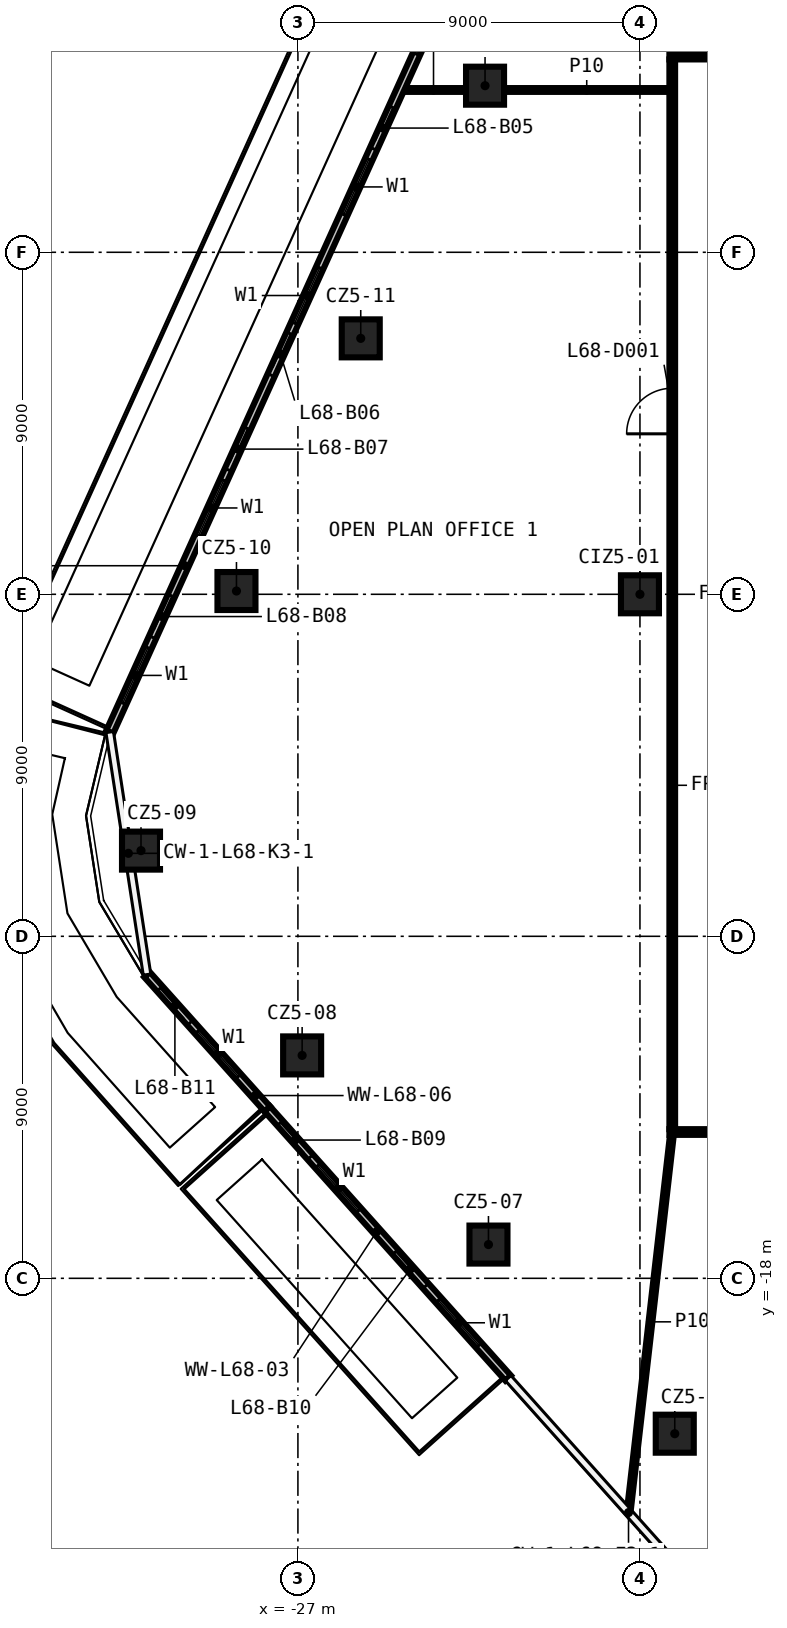
"""IFC4 building model, lengths in metres.
Left out: names, types, materials, properties, quantities, classifications, styles, units other than length and angle.
Written with IfcOpenShell. Run it as: python <this file> out.ifc"""

import sys

from ifc_helpers import new_model, si_unit, direction, frame, frame_2d, origin, origin_2d, place, context, subcontext, project, spatial, rectangle, extrude, element, fill, save


model = new_model("IFC4")
c1 = context("Model", 3, precision=1e-05, world=origin(), true_north=direction((0.0, 1.0)))
c2 = subcontext(c1, "Body", "Model", "MODEL_VIEW")
j1 = project(units=[si_unit("LENGTHUNIT", "METRE"), si_unit("PLANEANGLEUNIT", "RADIAN")], contexts=[c1])
p1 = place(None, origin())
s1 = spatial("IfcSite", under=j1, at=p1, CompositionType="ELEMENT")
p2 = place(p1, origin())
s2 = spatial("IfcBuilding", under=s1, at=p2, CompositionType="ELEMENT")
p3 = place(p2, frame((0.0, 0.0, 319.4)))
s3 = spatial("IfcBuildingStorey", under=s2, at=p3, CompositionType="ELEMENT", Elevation=319.4)
for number, where, z_axis, x_axis in (
    (1, (-17.084, -22.089, 0.0), (0.0, 0.0, 1.0), (1.0, 0.0, 0.0)),
    (2, (-21.986, -17.112, 0.0), (0.0, 0.0, 1.0), (1.0, 0.0, 0.0)),
    (3, (-26.889, -12.134, 0.0), (0.0, 0.0, 1.0), (1.0, 0.0, 0.0)),
    (4, (-31.129, -6.745, 0.0), (0.0, 0.0, 1.0), (1.0, 0.0, 0.0)),
    (5, (-28.617, 0.086, 0.0), (0.0, 0.0, 1.0), (1.0, 0.0, 0.0)),
    (6, (-25.347, 6.735, 0.0), (0.0, 0.0, 1.0), (1.0, 0.0, 0.0)),
    (7, (-22.076, 13.384, 0.0), (0.0, 0.0, 1.0), (1.0, 0.0, 0.0)),
    (8, (-18.0, 0.0, 0.0), (0.0, 0.0, 1.0), (1.0, 0.0, 0.0)),
):
    element("IfcColumn", number, at=place(p3, frame(where, z_axis=z_axis, x_axis=x_axis)), inside=s3, PredefinedType="COLUMN", context=c2, shape_type="SweptSolid", body=[
        extrude(rectangle(XDim=1.0, YDim=1.0, at=origin_2d()), origin(), (0.0, 0.0, 1.0), 3.82),
    ])
p4 = place(p3, frame((17.225, -14.15, 0.0), z_axis=(0.0, 0.0, 1.0), x_axis=(-1.0, 0.0, 0.0)))
e9 = element("IfcWall", 9, at=p4, inside=s3, PredefinedType="PARTITIONING", context=c2, shape_type="SweptSolid", body=[
    extrude(rectangle(XDim=34.45, YDim=0.15, at=frame_2d((17.225, 0.0))), origin(), (0.0, 0.0, 1.0), 3.82),
])
p5 = place(p4, frame((17.711, 0.0, 0.0)))
e10 = element("IfcOpeningElement", 10, at=p5, cuts=e9, PredefinedType="OPENING", context=c2, shape_type="SweptSolid", body=[
    extrude(rectangle(XDim=1.2, YDim=2.1, at=frame_2d((0.6, 1.05))), frame((0.0, 0.085, 0.0), z_axis=(0.0, -1.0, 0.0), x_axis=(1.0, 0.0, 0.0)), (0.0, 0.0, 1.0), 0.17),
])
p6 = place(p4, frame((4.094, 0.0, 0.0)))
e11 = element("IfcOpeningElement", 11, at=p6, cuts=e9, PredefinedType="OPENING", context=c2, shape_type="SweptSolid", body=[
    extrude(rectangle(XDim=1.2, YDim=2.1, at=frame_2d((0.6, 1.05))), frame((0.0, 0.085, 0.0), z_axis=(0.0, -1.0, 0.0), x_axis=(1.0, 0.0, 0.0)), (0.0, 0.0, 1.0), 0.17),
])
p7 = place(p3, frame((-24.288, 13.271, 0.0), z_axis=(0.0, 0.0, 1.0), x_axis=(1.0, 0.0, 0.0)))
e12 = element("IfcWall", 12, at=p7, inside=s3, PredefinedType="PARTITIONING", context=c2, shape_type="SweptSolid", body=[
    extrude(rectangle(XDim=1.712, YDim=0.1, at=frame_2d((0.856, 0.0))), origin(), (0.0, 0.0, 1.0), 3.82),
])
p8 = place(p3, frame((-21.576, 13.271, 0.0), z_axis=(0.0, 0.0, 1.0), x_axis=(1.0, 0.0, 0.0)))
e13 = element("IfcWall", 13, at=p8, inside=s3, PredefinedType="PARTITIONING", context=c2, shape_type="SweptSolid", body=[
    extrude(rectangle(XDim=4.351, YDim=0.1, at=frame_2d((2.175, 0.0))), origin(), (0.0, 0.0, 1.0), 3.82),
])
p9 = place(p3, frame((-17.225, 14.15, 0.0), z_axis=(0.0, 0.0, 1.0), x_axis=(1.0, 0.0, 0.0)))
e14 = element("IfcWall", 14, at=p9, inside=s3, PredefinedType="PARTITIONING", context=c2, shape_type="SweptSolid", body=[
    extrude(rectangle(XDim=34.45, YDim=0.15, at=frame_2d((17.225, 0.0))), origin(), (0.0, 0.0, 1.0), 3.82),
])
p10 = place(p9, frame((17.706, 0.0, 0.0)))
e15 = element("IfcOpeningElement", 15, at=p10, cuts=e14, PredefinedType="OPENING", context=c2, shape_type="SweptSolid", body=[
    extrude(rectangle(XDim=1.2, YDim=2.1, at=frame_2d((0.6, 1.05))), frame((0.0, 0.085, 0.0), z_axis=(0.0, -1.0, 0.0), x_axis=(1.0, 0.0, 0.0)), (0.0, 0.0, 1.0), 0.17),
])
p11 = place(p3, frame((-18.296, -24.14, 0.0), z_axis=(0.0, 0.0, 1.0), x_axis=(0.11391359401, 0.993490660801, 0.0)))
e16 = element("IfcWall", 16, at=p11, inside=s3, PredefinedType="PARTITIONING", context=c2, shape_type="SweptSolid", body=[
    extrude(rectangle(XDim=10.056, YDim=0.1, at=frame_2d((5.028, 0.0))), origin(), (0.0, 0.0, 1.0), 3.82),
])
p12 = place(p3, frame((-17.15, -14.075, 0.0), z_axis=(0.0, 0.0, 1.0), x_axis=(0.0, 1.0, 0.0)))
e17 = element("IfcWall", 17, at=p12, inside=s3, PredefinedType="PARTITIONING", context=c2, shape_type="SweptSolid", body=[
    extrude(rectangle(XDim=28.15, YDim=0.15, at=frame_2d((14.075, 0.0))), origin(), (0.0, 0.0, 1.0), 3.82),
])
p13 = place(p12, frame((18.298, 0.0, 0.0)))
e18 = element("IfcOpeningElement", 18, at=p13, cuts=e17, PredefinedType="OPENING", context=c2, shape_type="SweptSolid", body=[
    extrude(rectangle(XDim=1.2, YDim=2.1, at=frame_2d((0.6, 1.05))), frame((0.0, 0.085, 0.0), z_axis=(0.0, -1.0, 0.0), x_axis=(1.0, 0.0, 0.0)), (0.0, 0.0, 1.0), 0.17),
])
p14 = place(p3, frame((-22.399, 17.495, 0.0), z_axis=(0.0, 0.0, 1.0), x_axis=(-0.412123946496, -0.911127791654, 0.0)))
e19 = element("IfcWall", 19, at=p14, inside=s3, PredefinedType="SOLIDWALL", context=c2, shape_type="SweptSolid", body=[
    extrude(rectangle(XDim=23.18, YDim=0.2, at=frame_2d((11.59, 0.0))), origin(), (0.0, 0.0, 1.0), 3.82),
])
p15 = place(p14, frame((2.0, 0.0, 0.6)))
e20 = element("IfcOpeningElement", 20, at=p15, cuts=e19, PredefinedType="OPENING", context=c2, shape_type="SweptSolid", body=[
    extrude(rectangle(XDim=1.6, YDim=2.4, at=frame_2d((0.8, 1.2))), frame((0.0, 0.11, 0.0), z_axis=(0.0, -1.0, 0.0), x_axis=(1.0, 0.0, 0.0)), (0.0, 0.0, 1.0), 0.22),
])
p16 = place(p14, frame((0.5, 0.0, 0.0)))
e21 = element("IfcOpeningElement", 21, at=p16, cuts=e19, PredefinedType="OPENING", context=c2, shape_type="SweptSolid", body=[
    extrude(rectangle(XDim=1.2, YDim=2.4, at=frame_2d((0.6, 1.2))), frame((0.0, 0.11, 0.0), z_axis=(0.0, -1.0, 0.0), x_axis=(1.0, 0.0, 0.0)), (0.0, 0.0, 1.0), 0.22),
])
p17 = place(p14, frame((6.636, 0.0, 0.6)))
e22 = element("IfcOpeningElement", 22, at=p17, cuts=e19, PredefinedType="OPENING", context=c2, shape_type="SweptSolid", body=[
    extrude(rectangle(XDim=1.6, YDim=2.4, at=frame_2d((0.8, 1.2))), frame((0.0, 0.11, 0.0), z_axis=(0.0, -1.0, 0.0), x_axis=(1.0, 0.0, 0.0)), (0.0, 0.0, 1.0), 0.22),
])
p18 = place(p14, frame((5.136, 0.0, 0.0)))
e23 = element("IfcOpeningElement", 23, at=p18, cuts=e19, PredefinedType="OPENING", context=c2, shape_type="SweptSolid", body=[
    extrude(rectangle(XDim=1.2, YDim=2.4, at=frame_2d((0.6, 1.2))), frame((0.0, 0.11, 0.0), z_axis=(0.0, -1.0, 0.0), x_axis=(1.0, 0.0, 0.0)), (0.0, 0.0, 1.0), 0.22),
])
p19 = place(p14, frame((9.772, 0.0, 0.6)))
e24 = element("IfcOpeningElement", 24, at=p19, cuts=e19, PredefinedType="OPENING", context=c2, shape_type="SweptSolid", body=[
    extrude(rectangle(XDim=1.6, YDim=2.4, at=frame_2d((0.8, 1.2))), frame((0.0, 0.11, 0.0), z_axis=(0.0, -1.0, 0.0), x_axis=(1.0, 0.0, 0.0)), (0.0, 0.0, 1.0), 0.22),
])
p20 = place(p14, frame((11.672, 0.0, 0.0)))
e25 = element("IfcOpeningElement", 25, at=p20, cuts=e19, PredefinedType="OPENING", context=c2, shape_type="SweptSolid", body=[
    extrude(rectangle(XDim=1.2, YDim=2.4, at=frame_2d((0.6, 1.2))), frame((0.0, 0.11, 0.0), z_axis=(0.0, -1.0, 0.0), x_axis=(1.0, 0.0, 0.0)), (0.0, 0.0, 1.0), 0.22),
])
p21 = place(p14, frame((15.908, 0.0, 0.6)))
e26 = element("IfcOpeningElement", 26, at=p21, cuts=e19, PredefinedType="OPENING", context=c2, shape_type="SweptSolid", body=[
    extrude(rectangle(XDim=1.6, YDim=2.4, at=frame_2d((0.8, 1.2))), frame((0.0, 0.11, 0.0), z_axis=(0.0, -1.0, 0.0), x_axis=(1.0, 0.0, 0.0)), (0.0, 0.0, 1.0), 0.22),
])
p22 = place(p14, frame((14.408, 0.0, 0.0)))
e27 = element("IfcOpeningElement", 27, at=p22, cuts=e19, PredefinedType="OPENING", context=c2, shape_type="SweptSolid", body=[
    extrude(rectangle(XDim=1.2, YDim=2.4, at=frame_2d((0.6, 1.2))), frame((0.0, 0.11, 0.0), z_axis=(0.0, -1.0, 0.0), x_axis=(1.0, 0.0, 0.0)), (0.0, 0.0, 1.0), 0.22),
])
p23 = place(p14, frame((20.744, 0.0, 0.6)))
e28 = element("IfcOpeningElement", 28, at=p23, cuts=e19, PredefinedType="OPENING", context=c2, shape_type="SweptSolid", body=[
    extrude(rectangle(XDim=1.6, YDim=2.4, at=frame_2d((0.8, 1.2))), frame((0.0, 0.11, 0.0), z_axis=(0.0, -1.0, 0.0), x_axis=(1.0, 0.0, 0.0)), (0.0, 0.0, 1.0), 0.22),
])
p24 = place(p14, frame((19.244, 0.0, 0.0)))
e29 = element("IfcOpeningElement", 29, at=p24, cuts=e19, PredefinedType="OPENING", context=c2, shape_type="SweptSolid", body=[
    extrude(rectangle(XDim=1.2, YDim=2.4, at=frame_2d((0.6, 1.2))), frame((0.0, 0.11, 0.0), z_axis=(0.0, -1.0, 0.0), x_axis=(1.0, 0.0, 0.0)), (0.0, 0.0, 1.0), 0.22),
])
p25 = place(p3, frame((-27.807, -13.542, 0.0), z_axis=(0.0, 0.0, 1.0), x_axis=(0.666894702572, -0.745151968179, 0.0)))
e30 = element("IfcWall", 30, at=p25, inside=s3, PredefinedType="SOLIDWALL", context=c2, shape_type="SweptSolid", body=[
    extrude(rectangle(XDim=9.506, YDim=0.2, at=frame_2d((4.753, 0.0))), origin(), (0.0, 0.0, 1.0), 3.82),
])
p26 = place(p25, frame((2.0, 0.0, 0.6)))
e31 = element("IfcOpeningElement", 31, at=p26, cuts=e30, PredefinedType="OPENING", context=c2, shape_type="SweptSolid", body=[
    extrude(rectangle(XDim=1.6, YDim=2.4, at=frame_2d((0.8, 1.2))), frame((0.0, 0.11, 0.0), z_axis=(0.0, -1.0, 0.0), x_axis=(1.0, 0.0, 0.0)), (0.0, 0.0, 1.0), 0.22),
])
p27 = place(p25, frame((0.5, 0.0, 0.0)))
e32 = element("IfcOpeningElement", 32, at=p27, cuts=e30, PredefinedType="OPENING", context=c2, shape_type="SweptSolid", body=[
    extrude(rectangle(XDim=1.2, YDim=2.4, at=frame_2d((0.6, 1.2))), frame((0.0, 0.11, 0.0), z_axis=(0.0, -1.0, 0.0), x_axis=(1.0, 0.0, 0.0)), (0.0, 0.0, 1.0), 0.22),
])
p28 = place(p25, frame((6.753, 0.0, 0.6)))
e33 = element("IfcOpeningElement", 33, at=p28, cuts=e30, PredefinedType="OPENING", context=c2, shape_type="SweptSolid", body=[
    extrude(rectangle(XDim=1.6, YDim=2.4, at=frame_2d((0.8, 1.2))), frame((0.0, 0.11, 0.0), z_axis=(0.0, -1.0, 0.0), x_axis=(1.0, 0.0, 0.0)), (0.0, 0.0, 1.0), 0.22),
])
p29 = place(p25, frame((5.053, 0.0, 0.0)))
e34 = element("IfcOpeningElement", 34, at=p29, cuts=e30, PredefinedType="OPENING", context=c2, shape_type="SweptSolid", body=[
    extrude(rectangle(XDim=1.2, YDim=2.4, at=frame_2d((0.6, 1.2))), frame((0.0, 0.11, 0.0), z_axis=(0.0, -1.0, 0.0), x_axis=(1.0, 0.0, 0.0)), (0.0, 0.0, 1.0), 0.22),
])
p30 = place(p3, frame((-30.97, -10.007, 0.0), z_axis=(0.0, 0.0, 1.0), x_axis=(0.666852029375, -0.745190157556, 0.0)))
e35 = element("IfcWall", 35, at=p30, inside=s3, PredefinedType="SOLIDWALL", context=c2, shape_type="SweptSolid", body=[
    extrude(rectangle(XDim=4.743, YDim=0.2, at=frame_2d((2.372, 0.0))), origin(), (0.0, 0.0, 1.0), 3.82),
])
p31 = place(p30, frame((2.0, 0.0, 0.6)))
e36 = element("IfcOpeningElement", 36, at=p31, cuts=e35, PredefinedType="OPENING", context=c2, shape_type="SweptSolid", body=[
    extrude(rectangle(XDim=1.6, YDim=2.4, at=frame_2d((0.8, 1.2))), frame((0.0, 0.11, 0.0), z_axis=(0.0, -1.0, 0.0), x_axis=(1.0, 0.0, 0.0)), (0.0, 0.0, 1.0), 0.22),
])
p32 = place(p30, frame((0.5, 0.0, 0.0)))
e37 = element("IfcOpeningElement", 37, at=p32, cuts=e35, PredefinedType="OPENING", context=c2, shape_type="SweptSolid", body=[
    extrude(rectangle(XDim=1.2, YDim=2.4, at=frame_2d((0.6, 1.2))), frame((0.0, 0.11, 0.0), z_axis=(0.0, -1.0, 0.0), x_axis=(1.0, 0.0, 0.0)), (0.0, 0.0, 1.0), 0.22),
])
p33 = place(p13, origin())
e38 = element("IfcDoor", 38, at=p33, inside=s3, OperationType="SINGLE_SWING_RIGHT", PredefinedType="DOOR", context=c2, shape_type="SweptSolid", body=[
    extrude(rectangle(XDim=1.2, YDim=2.1, at=frame_2d((0.6, 1.05))), frame((0.0, 0.025, 0.0), z_axis=(0.0, -1.0, 0.0), x_axis=(1.0, 0.0, 0.0)), (0.0, 0.0, 1.0), 0.05),
])
fill(e18, e38)
p34 = place(p15, origin())
e39 = element("IfcWindow", 39, at=p34, inside=s3, PartitioningType="SINGLE_PANEL", PredefinedType="WINDOW", context=c2, shape_type="SweptSolid", body=[
    extrude(rectangle(XDim=1.6, YDim=2.4, at=frame_2d((0.8, 1.2))), frame((0.0, 0.03, 0.0), z_axis=(0.0, -1.0, 0.0), x_axis=(1.0, 0.0, 0.0)), (0.0, 0.0, 1.0), 0.06),
])
fill(e20, e39)
p35 = place(p17, origin())
e40 = element("IfcWindow", 40, at=p35, inside=s3, PartitioningType="SINGLE_PANEL", PredefinedType="WINDOW", context=c2, shape_type="SweptSolid", body=[
    extrude(rectangle(XDim=1.6, YDim=2.4, at=frame_2d((0.8, 1.2))), frame((0.0, 0.03, 0.0), z_axis=(0.0, -1.0, 0.0), x_axis=(1.0, 0.0, 0.0)), (0.0, 0.0, 1.0), 0.06),
])
fill(e22, e40)
p36 = place(p18, origin())
e41 = element("IfcDoor", 41, at=p36, inside=s3, OperationType="SLIDING_TO_LEFT", PredefinedType="DOOR", context=c2, shape_type="SweptSolid", body=[
    extrude(rectangle(XDim=1.2, YDim=2.4, at=frame_2d((0.6, 1.2))), frame((0.0, 0.025, 0.0), z_axis=(0.0, -1.0, 0.0), x_axis=(1.0, 0.0, 0.0)), (0.0, 0.0, 1.0), 0.05),
])
fill(e23, e41)
p37 = place(p19, origin())
e42 = element("IfcWindow", 42, at=p37, inside=s3, PartitioningType="SINGLE_PANEL", PredefinedType="WINDOW", context=c2, shape_type="SweptSolid", body=[
    extrude(rectangle(XDim=1.6, YDim=2.4, at=frame_2d((0.8, 1.2))), frame((0.0, 0.03, 0.0), z_axis=(0.0, -1.0, 0.0), x_axis=(1.0, 0.0, 0.0)), (0.0, 0.0, 1.0), 0.06),
])
fill(e24, e42)
p38 = place(p20, origin())
e43 = element("IfcDoor", 43, at=p38, inside=s3, OperationType="SLIDING_TO_LEFT", PredefinedType="DOOR", context=c2, shape_type="SweptSolid", body=[
    extrude(rectangle(XDim=1.2, YDim=2.4, at=frame_2d((0.6, 1.2))), frame((0.0, 0.025, 0.0), z_axis=(0.0, -1.0, 0.0), x_axis=(1.0, 0.0, 0.0)), (0.0, 0.0, 1.0), 0.05),
])
fill(e25, e43)
p39 = place(p21, origin())
e44 = element("IfcWindow", 44, at=p39, inside=s3, PartitioningType="SINGLE_PANEL", PredefinedType="WINDOW", context=c2, shape_type="SweptSolid", body=[
    extrude(rectangle(XDim=1.6, YDim=2.4, at=frame_2d((0.8, 1.2))), frame((0.0, 0.03, 0.0), z_axis=(0.0, -1.0, 0.0), x_axis=(1.0, 0.0, 0.0)), (0.0, 0.0, 1.0), 0.06),
])
fill(e26, e44)
p40 = place(p22, origin())
e45 = element("IfcDoor", 45, at=p40, inside=s3, OperationType="SLIDING_TO_LEFT", PredefinedType="DOOR", context=c2, shape_type="SweptSolid", body=[
    extrude(rectangle(XDim=1.2, YDim=2.4, at=frame_2d((0.6, 1.2))), frame((0.0, 0.025, 0.0), z_axis=(0.0, -1.0, 0.0), x_axis=(1.0, 0.0, 0.0)), (0.0, 0.0, 1.0), 0.05),
])
fill(e27, e45)
p41 = place(p23, origin())
e46 = element("IfcWindow", 46, at=p41, inside=s3, PartitioningType="SINGLE_PANEL", PredefinedType="WINDOW", context=c2, shape_type="SweptSolid", body=[
    extrude(rectangle(XDim=1.6, YDim=2.4, at=frame_2d((0.8, 1.2))), frame((0.0, 0.03, 0.0), z_axis=(0.0, -1.0, 0.0), x_axis=(1.0, 0.0, 0.0)), (0.0, 0.0, 1.0), 0.06),
])
fill(e28, e46)
p42 = place(p24, origin())
e47 = element("IfcDoor", 47, at=p42, inside=s3, OperationType="SLIDING_TO_LEFT", PredefinedType="DOOR", context=c2, shape_type="SweptSolid", body=[
    extrude(rectangle(XDim=1.2, YDim=2.4, at=frame_2d((0.6, 1.2))), frame((0.0, 0.025, 0.0), z_axis=(0.0, -1.0, 0.0), x_axis=(1.0, 0.0, 0.0)), (0.0, 0.0, 1.0), 0.05),
])
fill(e29, e47)
p43 = place(p26, origin())
e48 = element("IfcWindow", 48, at=p43, inside=s3, PartitioningType="SINGLE_PANEL", PredefinedType="WINDOW", context=c2, shape_type="SweptSolid", body=[
    extrude(rectangle(XDim=1.6, YDim=2.4, at=frame_2d((0.8, 1.2))), frame((0.0, 0.03, 0.0), z_axis=(0.0, -1.0, 0.0), x_axis=(1.0, 0.0, 0.0)), (0.0, 0.0, 1.0), 0.06),
])
fill(e31, e48)
p44 = place(p27, origin())
e49 = element("IfcDoor", 49, at=p44, inside=s3, OperationType="SLIDING_TO_LEFT", PredefinedType="DOOR", context=c2, shape_type="SweptSolid", body=[
    extrude(rectangle(XDim=1.2, YDim=2.4, at=frame_2d((0.6, 1.2))), frame((0.0, 0.025, 0.0), z_axis=(0.0, -1.0, 0.0), x_axis=(1.0, 0.0, 0.0)), (0.0, 0.0, 1.0), 0.05),
])
fill(e32, e49)
p45 = place(p28, origin())
e50 = element("IfcWindow", 50, at=p45, inside=s3, PartitioningType="SINGLE_PANEL", PredefinedType="WINDOW", context=c2, shape_type="SweptSolid", body=[
    extrude(rectangle(XDim=1.6, YDim=2.4, at=frame_2d((0.8, 1.2))), frame((0.0, 0.03, 0.0), z_axis=(0.0, -1.0, 0.0), x_axis=(1.0, 0.0, 0.0)), (0.0, 0.0, 1.0), 0.06),
])
fill(e33, e50)
p46 = place(p29, origin())
e51 = element("IfcDoor", 51, at=p46, inside=s3, OperationType="SLIDING_TO_LEFT", PredefinedType="DOOR", context=c2, shape_type="SweptSolid", body=[
    extrude(rectangle(XDim=1.2, YDim=2.4, at=frame_2d((0.6, 1.2))), frame((0.0, 0.025, 0.0), z_axis=(0.0, -1.0, 0.0), x_axis=(1.0, 0.0, 0.0)), (0.0, 0.0, 1.0), 0.05),
])
fill(e34, e51)
p47 = place(p31, origin())
e52 = element("IfcWindow", 52, at=p47, inside=s3, PartitioningType="SINGLE_PANEL", PredefinedType="WINDOW", context=c2, shape_type="SweptSolid", body=[
    extrude(rectangle(XDim=1.6, YDim=2.4, at=frame_2d((0.8, 1.2))), frame((0.0, 0.03, 0.0), z_axis=(0.0, -1.0, 0.0), x_axis=(1.0, 0.0, 0.0)), (0.0, 0.0, 1.0), 0.06),
])
fill(e36, e52)
p48 = place(p32, origin())
e53 = element("IfcDoor", 53, at=p48, inside=s3, OperationType="SLIDING_TO_LEFT", PredefinedType="DOOR", context=c2, shape_type="SweptSolid", body=[
    extrude(rectangle(XDim=1.2, YDim=2.4, at=frame_2d((0.6, 1.2))), frame((0.0, 0.025, 0.0), z_axis=(0.0, -1.0, 0.0), x_axis=(1.0, 0.0, 0.0)), (0.0, 0.0, 1.0), 0.05),
])
fill(e37, e53)
save(model, sys.argv[1])
